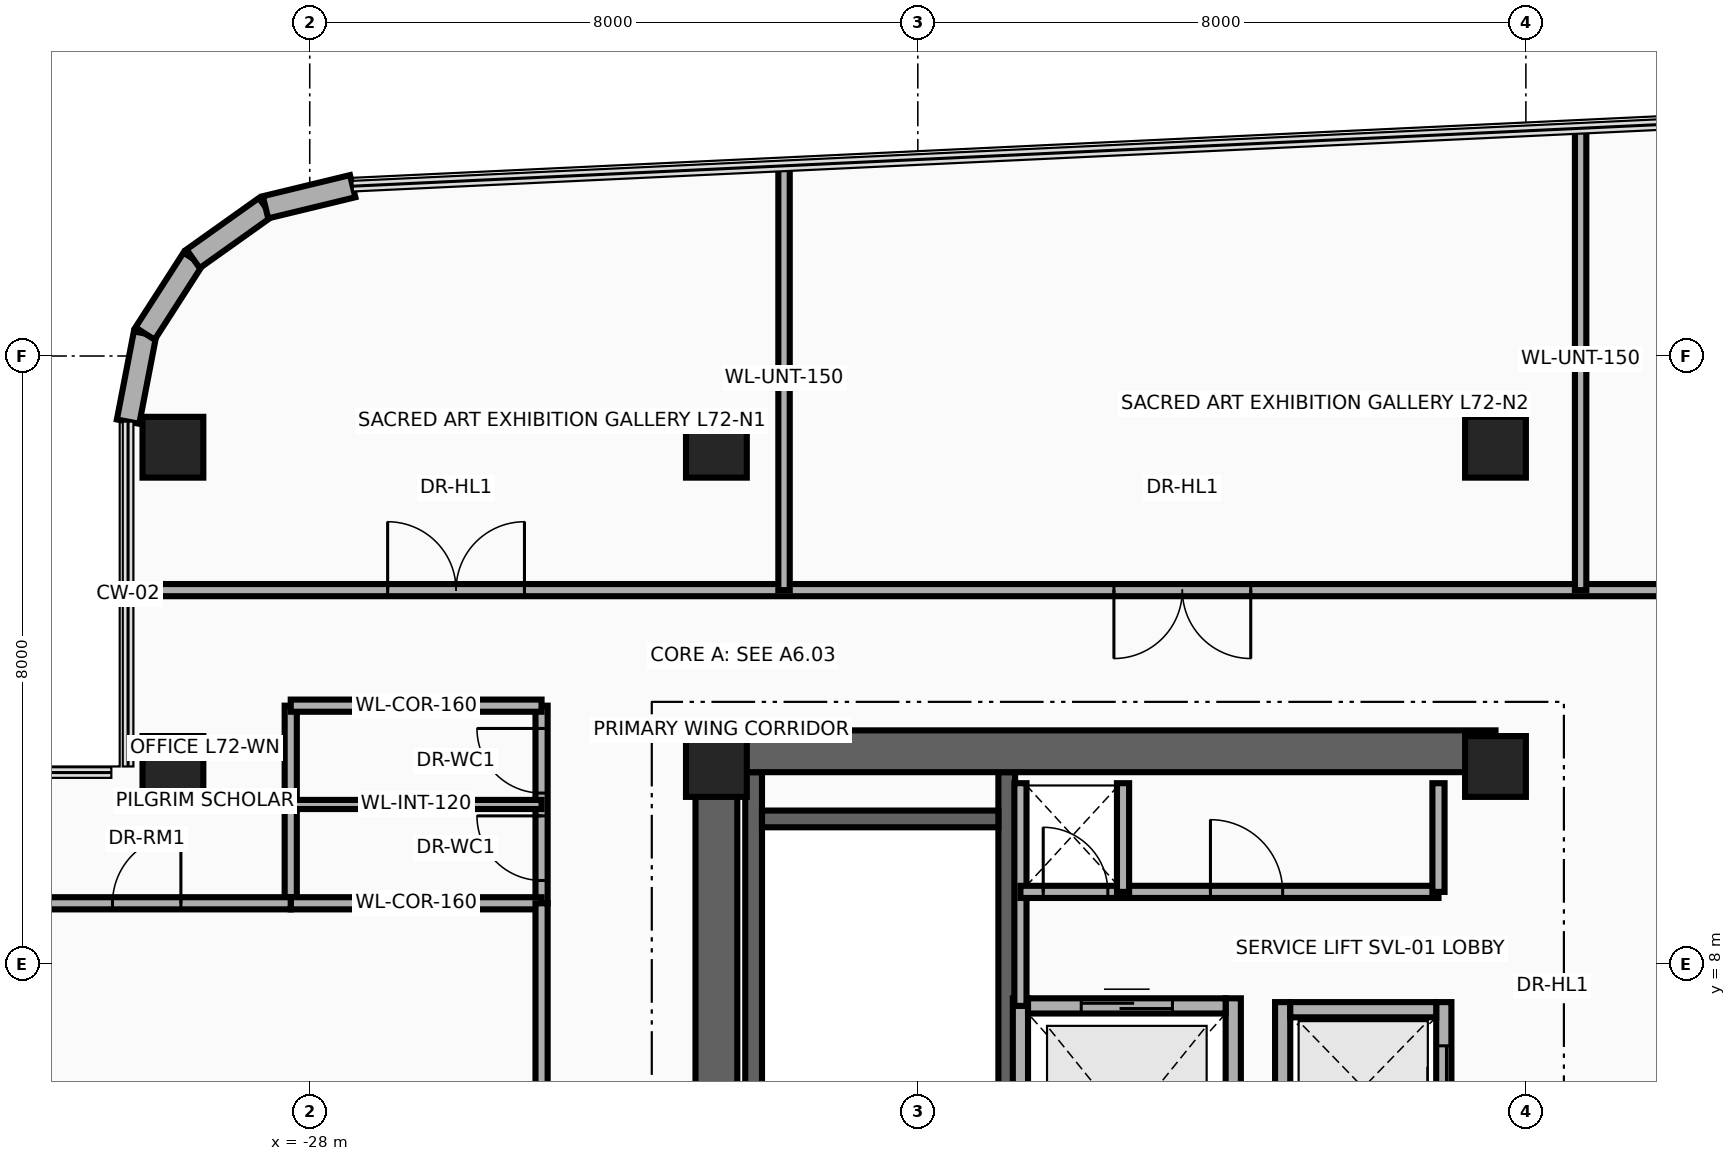
"""IFC4 building model, lengths in metres.
Left out: names, types, materials, properties, quantities, classifications, styles, units other than length and angle.
Written with IfcOpenShell. Run it as: python <this file> out.ifc"""

import sys

from ifc_helpers import new_model, si_unit, direction, frame, frame_2d, origin, origin_2d, place, context, subcontext, project, spatial, rectangle, extrude, source, transform, mapped, element, fill, save


model = new_model("IFC4")
c1 = context("Model", 3, precision=1e-05, world=origin(), true_north=direction((0.0, 1.0)))
c2 = subcontext(c1, "Body", "Model", "MODEL_VIEW")
j1 = project(units=[si_unit("LENGTHUNIT", "METRE"), si_unit("PLANEANGLEUNIT", "RADIAN")], contexts=[c1])
p1 = place(None, origin())
s1 = spatial("IfcSite", under=j1, at=p1, CompositionType="ELEMENT")
p2 = place(p1, origin())
s2 = spatial("IfcBuilding", under=s1, at=p2, CompositionType="ELEMENT")
p3 = place(p2, frame((0.0, 0.0, 276.5)))
s3 = spatial("IfcBuildingStorey", under=s2, at=p3, CompositionType="ELEMENT", Elevation=276.5)
for number, where, z_axis, x_axis in (
    (1, (-22.16, 1.78, 0.0), (0.0, 0.0, 1.0), (0.0, 1.0, 0.0)),
    (2, (-18.83, 1.78, 0.0), (0.0, 0.0, 1.0), (0.0, 1.0, 0.0)),
):
    element("IfcWall", number, at=place(p3, frame(where, z_axis=z_axis, x_axis=x_axis)), inside=s3, PredefinedType="SHEAR", context=c2, shape_type="SweptSolid", body=[
        extrude(rectangle(XDim=8.745, YDim=0.22, at=frame_2d((4.373, 0.0))), origin(), (0.0, 0.0, 1.0), 3.26),
    ])
p4 = place(p3, frame((-22.05, 9.91, 0.0), z_axis=(0.0, 0.0, 1.0), x_axis=(1.0, 0.0, 0.0)))
e3 = element("IfcWall", 3, at=p4, inside=s3, PredefinedType="SHEAR", context=c2, shape_type="SweptSolid", body=[
    extrude(rectangle(XDim=3.11, YDim=0.22, at=frame_2d((1.555, 0.0))), origin(), (0.0, 0.0, 1.0), 3.26),
])
p5 = place(p3, frame((-22.65, -11.075, 0.0), z_axis=(0.0, 0.0, 1.0), x_axis=(0.0, 1.0, 0.0)))
e4 = element("IfcWall", 4, at=p5, inside=s3, PredefinedType="SHEAR", context=c2, shape_type="SweptSolid", body=[
    extrude(rectangle(XDim=22.15, YDim=0.55, at=frame_2d((11.075, 0.0))), origin(), (0.0, 0.0, 1.0), 3.26),
])
p6 = place(p3, frame((-22.65, 10.8, 0.0), z_axis=(0.0, 0.0, 1.0), x_axis=(1.0, 0.0, 0.0)))
e5 = element("IfcWall", 5, at=p6, inside=s3, PredefinedType="SHEAR", context=c2, shape_type="SweptSolid", body=[
    extrude(rectangle(XDim=10.25, YDim=0.55, at=frame_2d((5.125, 0.0))), origin(), (0.0, 0.0, 1.0), 3.26),
])
m1 = source(origin(), c2, "Body", "SweptSolid", [
    extrude(rectangle(XDim=0.8, YDim=0.8, at=origin_2d()), origin(), (0.0, 0.0, 1.0), 3.5),
])
for number, where, z_axis, x_axis in (
    (6, (-29.8, 10.6, 0.0), (0.0, 0.0, 1.0), (1.0, 0.0, 0.0)),
    (7, (-22.65, 10.6, 0.0), (0.0, 0.0, 1.0), (1.0, 0.0, 0.0)),
    (8, (-12.4, 10.6, 0.0), (0.0, 0.0, 1.0), (1.0, 0.0, 0.0)),
    (9, (-29.8, 14.8, 0.0), (0.0, 0.0, 1.0), (1.0, 0.0, 0.0)),
    (10, (-22.65, 14.8, 0.0), (0.0, 0.0, 1.0), (1.0, 0.0, 0.0)),
    (11, (-12.4, 14.8, 0.0), (0.0, 0.0, 1.0), (1.0, 0.0, 0.0)),
):
    element("IfcColumn", number, at=place(p3, frame(where, z_axis=z_axis, x_axis=x_axis)), inside=s3, PredefinedType="COLUMN", context=c2, shape_type="MappedRepresentation", body=[
        mapped(m1, transform((0.0, 0.0, 0.0), x_axis=(1.0, 0.0, 0.0), y_axis=(0.0, 1.0, 0.0), z_axis=(0.0, 0.0, 1.0), scale=1.0)),
    ])
p7 = place(p3, frame((-30.39, 15.137, 0.0), z_axis=(0.0, 0.0, 1.0), x_axis=(0.189307792679, 0.981917796779, 0.0)))
e12 = element("IfcWall", 12, at=p7, inside=s3, PredefinedType="SOLIDWALL", context=c2, shape_type="SweptSolid", body=[
    extrude(rectangle(XDim=1.18, YDim=0.3, at=frame_2d((0.59, 0.0))), origin(), (0.0, 0.0, 1.0), 3.26),
])
p8 = place(p3, frame((-30.167, 16.295, 0.0), z_axis=(0.0, 0.0, 1.0), x_axis=(0.540842020947, 0.841124193195, 0.0)))
e13 = element("IfcWall", 13, at=p8, inside=s3, PredefinedType="SOLIDWALL", context=c2, shape_type="SweptSolid", body=[
    extrude(rectangle(XDim=1.169, YDim=0.3, at=frame_2d((0.584, 0.0))), origin(), (0.0, 0.0, 1.0), 3.26),
])
p9 = place(p3, frame((-29.534, 17.279, 0.0), z_axis=(0.0, 0.0, 1.0), x_axis=(0.81466371606, 0.579933642527, 0.0)))
e14 = element("IfcWall", 14, at=p9, inside=s3, PredefinedType="SOLIDWALL", context=c2, shape_type="SweptSolid", body=[
    extrude(rectangle(XDim=1.169, YDim=0.3, at=frame_2d((0.584, 0.0))), origin(), (0.0, 0.0, 1.0), 3.26),
])
p10 = place(p3, frame((-28.582, 17.957, 0.0), z_axis=(0.0, 0.0, 1.0), x_axis=(0.971929016595, 0.235274279725, 0.0)))
e15 = element("IfcWall", 15, at=p10, inside=s3, PredefinedType="SOLIDWALL", context=c2, shape_type="SweptSolid", body=[
    extrude(rectangle(XDim=1.18, YDim=0.3, at=frame_2d((0.59, 0.0))), origin(), (0.0, 0.0, 1.0), 3.26),
])
for number, where, z_axis, x_axis in (
    (16, (-18.65, 4.225, 0.0), (0.0, 0.0, 1.0), (0.0, 1.0, 0.0)),
    (17, (-15.85, 4.225, 0.0), (0.0, 0.0, 1.0), (0.0, 1.0, 0.0)),
):
    element("IfcWall", number, at=place(p3, frame(where, z_axis=z_axis, x_axis=x_axis)), inside=s3, PredefinedType="MOVABLE", context=c2, shape_type="SweptSolid", body=[
        extrude(rectangle(XDim=3.325, YDim=0.2, at=frame_2d((1.663, 0.0))), origin(), (0.0, 0.0, 1.0), 3.26),
    ])
p11 = place(p3, frame((-18.55, 7.45, 0.0), z_axis=(0.0, 0.0, 1.0), x_axis=(1.0, 0.0, 0.0)))
e18 = element("IfcWall", 18, at=p11, inside=s3, PredefinedType="MOVABLE", context=c2, shape_type="SweptSolid", body=[
    extrude(rectangle(XDim=2.6, YDim=0.2, at=frame_2d((1.3, 0.0))), origin(), (0.0, 0.0, 1.0), 3.26),
])
p12 = place(p11, frame((0.7, 0.0, 0.0)))
e19 = element("IfcOpeningElement", 19, at=p12, cuts=e18, PredefinedType="OPENING", context=c2, shape_type="SweptSolid", body=[
    extrude(rectangle(XDim=1.2, YDim=2.1, at=frame_2d((0.6, 1.05))), frame((0.0, 0.115, 0.0), z_axis=(0.0, -1.0, 0.0), x_axis=(1.0, 0.0, 0.0)), (0.0, 0.0, 1.0), 0.23),
])
p13 = place(p3, frame((-15.2, 5.25, 0.0), z_axis=(0.0, 0.0, 1.0), x_axis=(0.0, 1.0, 0.0)))
e20 = element("IfcWall", 20, at=p13, inside=s3, PredefinedType="MOVABLE", context=c2, shape_type="SweptSolid", body=[
    extrude(rectangle(XDim=2.25, YDim=0.2, at=frame_2d((1.125, 0.0))), origin(), (0.0, 0.0, 1.0), 3.26),
])
p14 = place(p3, frame((-13.08, 5.25, 0.0), z_axis=(0.0, 0.0, 1.0), x_axis=(0.0, 1.0, 0.0)))
e21 = element("IfcWall", 21, at=p14, inside=s3, PredefinedType="MOVABLE", context=c2, shape_type="SweptSolid", body=[
    extrude(rectangle(XDim=2.25, YDim=0.2, at=frame_2d((1.125, 0.0))), origin(), (0.0, 0.0, 1.0), 3.26),
])
p15 = place(p14, frame((0.575, 0.0, 0.0)))
e22 = element("IfcOpeningElement", 22, at=p15, cuts=e21, PredefinedType="OPENING", context=c2, shape_type="SweptSolid", body=[
    extrude(rectangle(XDim=1.1, YDim=2.1, at=frame_2d((0.55, 1.05))), frame((0.0, 0.115, 0.0), z_axis=(0.0, -1.0, 0.0), x_axis=(1.0, 0.0, 0.0)), (0.0, 0.0, 1.0), 0.23),
])
p16 = place(p3, frame((-15.1, 7.4, 0.0), z_axis=(0.0, 0.0, 1.0), x_axis=(1.0, 0.0, 0.0)))
e23 = element("IfcWall", 23, at=p16, inside=s3, PredefinedType="MOVABLE", context=c2, shape_type="SweptSolid", body=[
    extrude(rectangle(XDim=1.92, YDim=0.2, at=frame_2d((0.96, 0.0))), origin(), (0.0, 0.0, 1.0), 3.26),
])
p17 = place(p3, frame((-18.65, 7.45, 0.0), z_axis=(0.0, 0.0, 1.0), x_axis=(0.0, 1.0, 0.0)))
e24 = element("IfcWall", 24, at=p17, inside=s3, PredefinedType="PARTITIONING", context=c2, shape_type="SweptSolid", body=[
    extrude(rectangle(XDim=2.93, YDim=0.16, at=frame_2d((1.465, 0.0))), origin(), (0.0, 0.0, 1.0), 3.26),
])
p18 = place(p3, frame((-18.65, 8.95, 0.0), z_axis=(0.0, 0.0, 1.0), x_axis=(1.0, 0.0, 0.0)))
e25 = element("IfcWall", 25, at=p18, inside=s3, PredefinedType="PARTITIONING", context=c2, shape_type="SweptSolid", body=[
    extrude(rectangle(XDim=5.5, YDim=0.16, at=frame_2d((2.75, 0.0))), origin(), (0.0, 0.0, 1.0), 3.26),
])
p19 = place(p18, frame((0.3, 0.0, 0.0)))
e26 = element("IfcOpeningElement", 26, at=p19, cuts=e25, PredefinedType="OPENING", context=c2, shape_type="SweptSolid", body=[
    extrude(rectangle(XDim=0.85, YDim=2.05, at=frame_2d((0.425, 1.025))), frame((0.0, 0.095, 0.0), z_axis=(0.0, -1.0, 0.0), x_axis=(1.0, 0.0, 0.0)), (0.0, 0.0, 1.0), 0.19),
])
p20 = place(p18, frame((2.5, 0.0, 0.0)))
e27 = element("IfcOpeningElement", 27, at=p20, cuts=e25, PredefinedType="OPENING", context=c2, shape_type="SweptSolid", body=[
    extrude(rectangle(XDim=0.95, YDim=2.15, at=frame_2d((0.475, 1.075))), frame((0.0, 0.095, 0.0), z_axis=(0.0, -1.0, 0.0), x_axis=(1.0, 0.0, 0.0)), (0.0, 0.0, 1.0), 0.19),
])
for number, where, z_axis, x_axis in (
    (28, (-13.15, 8.95, 0.0), (0.0, 0.0, 1.0), (0.0, 1.0, 0.0)),
    (29, (-17.3, 8.95, 0.0), (0.0, 0.0, 1.0), (0.0, 1.0, 0.0)),
):
    element("IfcWall", number, at=place(p3, frame(where, z_axis=z_axis, x_axis=x_axis)), inside=s3, PredefinedType="PARTITIONING", context=c2, shape_type="SweptSolid", body=[
        extrude(rectangle(XDim=1.43, YDim=0.16, at=frame_2d((0.715, 0.0))), origin(), (0.0, 0.0, 1.0), 3.26),
    ])
p21 = place(p3, frame((-28.25, 8.8, 0.0), z_axis=(0.0, 0.0, 1.0), x_axis=(0.0, 1.0, 0.0)))
e30 = element("IfcWall", 30, at=p21, inside=s3, PredefinedType="PARTITIONING", context=c2, shape_type="SweptSolid", body=[
    extrude(rectangle(XDim=2.6, YDim=0.16, at=frame_2d((1.3, 0.0))), origin(), (0.0, 0.0, 1.0), 2.623),
])
p22 = place(p3, frame((-24.95, 8.8, 0.0), z_axis=(0.0, 0.0, 1.0), x_axis=(0.0, 1.0, 0.0)))
e31 = element("IfcWall", 31, at=p22, inside=s3, PredefinedType="PARTITIONING", context=c2, shape_type="SweptSolid", body=[
    extrude(rectangle(XDim=2.6, YDim=0.16, at=frame_2d((1.3, 0.0))), origin(), (0.0, 0.0, 1.0), 2.623),
])
p23 = place(p22, frame((0.3, 0.0, 0.0)))
e32 = element("IfcOpeningElement", 32, at=p23, cuts=e31, PredefinedType="OPENING", context=c2, shape_type="SweptSolid", body=[
    extrude(rectangle(XDim=0.85, YDim=2.1, at=frame_2d((0.425, 1.05))), frame((0.0, 0.095, 0.0), z_axis=(0.0, -1.0, 0.0), x_axis=(1.0, 0.0, 0.0)), (0.0, 0.0, 1.0), 0.19),
])
p24 = place(p22, frame((1.45, 0.0, 0.0)))
e33 = element("IfcOpeningElement", 33, at=p24, cuts=e31, PredefinedType="OPENING", context=c2, shape_type="SweptSolid", body=[
    extrude(rectangle(XDim=0.85, YDim=2.1, at=frame_2d((0.425, 1.05))), frame((0.0, 0.095, 0.0), z_axis=(0.0, -1.0, 0.0), x_axis=(1.0, 0.0, 0.0)), (0.0, 0.0, 1.0), 0.19),
])
for number, where, z_axis, x_axis in (
    (34, (-28.25, 8.8, 0.0), (0.0, 0.0, 1.0), (1.0, 0.0, 0.0)),
    (35, (-28.25, 11.4, 0.0), (0.0, 0.0, 1.0), (1.0, 0.0, 0.0)),
):
    element("IfcWall", number, at=place(p3, frame(where, z_axis=z_axis, x_axis=x_axis)), inside=s3, PredefinedType="PARTITIONING", context=c2, shape_type="SweptSolid", body=[
        extrude(rectangle(XDim=3.3, YDim=0.16, at=frame_2d((1.65, 0.0))), origin(), (0.0, 0.0, 1.0), 3.26),
    ])
p25 = place(p3, frame((-28.25, 10.1, 0.0), z_axis=(0.0, 0.0, 1.0), x_axis=(1.0, 0.0, 0.0)))
e36 = element("IfcWall", 36, at=p25, inside=s3, PredefinedType="PARTITIONING", context=c2, shape_type="SweptSolid", body=[
    extrude(rectangle(XDim=3.3, YDim=0.12, at=frame_2d((1.65, 0.0))), origin(), (0.0, 0.0, 1.0), 3.26),
])
p26 = place(p3, frame((-24.95, -11.42, 0.0), z_axis=(0.0, 0.0, 1.0), x_axis=(0.0, 1.0, 0.0)))
e37 = element("IfcWall", 37, at=p26, inside=s3, PredefinedType="PARTITIONING", context=c2, shape_type="SweptSolid", body=[
    extrude(rectangle(XDim=20.22, YDim=0.16, at=frame_2d((10.11, 0.0))), origin(), (0.0, 0.0, 1.0), 2.623),
])
p27 = place(p26, frame((4.155, 0.0, 0.0)))
e38 = element("IfcOpeningElement", 38, at=p27, cuts=e37, PredefinedType="OPENING", context=c2, shape_type="SweptSolid", body=[
    extrude(rectangle(XDim=1.8, YDim=2.15, at=frame_2d((0.9, 1.075))), frame((0.0, 0.095, 0.0), z_axis=(0.0, -1.0, 0.0), x_axis=(1.0, 0.0, 0.0)), (0.0, 0.0, 1.0), 0.19),
])
p28 = place(p26, frame((14.715, 0.0, 0.0)))
e39 = element("IfcOpeningElement", 39, at=p28, cuts=e37, PredefinedType="OPENING", context=c2, shape_type="SweptSolid", body=[
    extrude(rectangle(XDim=0.9, YDim=2.1, at=frame_2d((0.45, 1.05))), frame((0.0, 0.095, 0.0), z_axis=(0.0, -1.0, 0.0), x_axis=(1.0, 0.0, 0.0)), (0.0, 0.0, 1.0), 0.19),
])
p29 = place(p3, frame((-32.04, 8.8, 0.0), z_axis=(0.0, 0.0, 1.0), x_axis=(1.0, 0.0, 0.0)))
e40 = element("IfcWall", 40, at=p29, inside=s3, PredefinedType="PARTITIONING", context=c2, shape_type="SweptSolid", body=[
    extrude(rectangle(XDim=3.79, YDim=0.16, at=frame_2d((1.895, 0.0))), origin(), (0.0, 0.0, 1.0), 2.706),
])
p30 = place(p29, frame((1.445, 0.0, 0.0)))
e41 = element("IfcOpeningElement", 41, at=p30, cuts=e40, PredefinedType="OPENING", context=c2, shape_type="SweptSolid", body=[
    extrude(rectangle(XDim=0.9, YDim=2.1, at=frame_2d((0.45, 1.05))), frame((0.0, 0.095, 0.0), z_axis=(0.0, -1.0, 0.0), x_axis=(1.0, 0.0, 0.0)), (0.0, 0.0, 1.0), 0.19),
])
p31 = place(p3, frame((-30.39, 12.92, 0.0), z_axis=(0.0, 0.0, 1.0), x_axis=(1.0, 0.0, 0.0)))
e42 = element("IfcWall", 42, at=p31, inside=s3, PredefinedType="PARTITIONING", context=c2, shape_type="SweptSolid", body=[
    extrude(rectangle(XDim=29.48, YDim=0.16, at=frame_2d((14.74, 0.0))), origin(), (0.0, 0.0, 1.0), 2.634),
])
p32 = place(p31, frame((3.415, 0.0, 0.0)))
e43 = element("IfcOpeningElement", 43, at=p32, cuts=e42, PredefinedType="OPENING", context=c2, shape_type="SweptSolid", body=[
    extrude(rectangle(XDim=1.8, YDim=2.15, at=frame_2d((0.9, 1.075))), frame((0.0, 0.095, 0.0), z_axis=(0.0, -1.0, 0.0), x_axis=(1.0, 0.0, 0.0)), (0.0, 0.0, 1.0), 0.19),
])
p33 = place(p31, frame((12.97, 0.0, 0.0)))
e44 = element("IfcOpeningElement", 44, at=p33, cuts=e42, PredefinedType="OPENING", context=c2, shape_type="SweptSolid", body=[
    extrude(rectangle(XDim=1.8, YDim=2.15, at=frame_2d((0.9, 1.075))), frame((0.0, 0.095, 0.0), z_axis=(0.0, -1.0, 0.0), x_axis=(1.0, 0.0, 0.0)), (0.0, 0.0, 1.0), 0.19),
])
p34 = place(p31, frame((23.395, 0.0, 0.0)))
e45 = element("IfcOpeningElement", 45, at=p34, cuts=e42, PredefinedType="OPENING", context=c2, shape_type="SweptSolid", body=[
    extrude(rectangle(XDim=1.8, YDim=2.15, at=frame_2d((0.9, 1.075))), frame((0.0, 0.095, 0.0), z_axis=(0.0, -1.0, 0.0), x_axis=(1.0, 0.0, 0.0)), (0.0, 0.0, 1.0), 0.19),
])
p35 = place(p3, frame((-21.76, 12.92, 0.0), z_axis=(0.0, 0.0, 1.0), x_axis=(0.0, 1.0, 0.0)))
e46 = element("IfcWall", 46, at=p35, inside=s3, PredefinedType="PARTITIONING", context=c2, shape_type="SweptSolid", body=[
    extrude(rectangle(XDim=5.582, YDim=0.15, at=frame_2d((2.791, 0.0))), origin(), (0.0, 0.0, 1.0), 2.623),
])
p36 = place(p3, frame((-11.28, 12.92, 0.0), z_axis=(0.0, 0.0, 1.0), x_axis=(0.0, 1.0, 0.0)))
e47 = element("IfcWall", 47, at=p36, inside=s3, PredefinedType="PARTITIONING", context=c2, shape_type="SweptSolid", body=[
    extrude(rectangle(XDim=6.076, YDim=0.15, at=frame_2d((3.038, 0.0))), origin(), (0.0, 0.0, 1.0), 3.26),
])
p37 = place(p12, origin())
e48 = element("IfcDoor", 48, at=p37, inside=s3, OperationType="DOUBLE_DOOR_SLIDING", PredefinedType="DOOR", context=c2, shape_type="SweptSolid", body=[
    extrude(rectangle(XDim=1.2, YDim=2.1, at=frame_2d((0.6, 1.05))), frame((0.0, 0.025, 0.0), z_axis=(0.0, -1.0, 0.0), x_axis=(1.0, 0.0, 0.0)), (0.0, 0.0, 1.0), 0.05),
])
fill(e19, e48)
p38 = place(p15, origin())
e49 = element("IfcDoor", 49, at=p38, inside=s3, OperationType="DOUBLE_DOOR_SLIDING", PredefinedType="DOOR", context=c2, shape_type="SweptSolid", body=[
    extrude(rectangle(XDim=1.1, YDim=2.1, at=frame_2d((0.55, 1.05))), frame((0.0, 0.025, 0.0), z_axis=(0.0, -1.0, 0.0), x_axis=(1.0, 0.0, 0.0)), (0.0, 0.0, 1.0), 0.05),
])
fill(e22, e49)
p39 = place(p19, origin())
e50 = element("IfcDoor", 50, at=p39, inside=s3, OperationType="SINGLE_SWING_LEFT", PredefinedType="DOOR", context=c2, shape_type="SweptSolid", body=[
    extrude(rectangle(XDim=0.85, YDim=2.05, at=frame_2d((0.425, 1.025))), frame((0.0, 0.025, 0.0), z_axis=(0.0, -1.0, 0.0), x_axis=(1.0, 0.0, 0.0)), (0.0, 0.0, 1.0), 0.05),
])
fill(e26, e50)
p40 = place(p20, origin())
e51 = element("IfcDoor", 51, at=p40, inside=s3, OperationType="SINGLE_SWING_RIGHT", PredefinedType="DOOR", context=c2, shape_type="SweptSolid", body=[
    extrude(rectangle(XDim=0.95, YDim=2.15, at=frame_2d((0.475, 1.075))), frame((0.0, 0.025, 0.0), z_axis=(0.0, -1.0, 0.0), x_axis=(1.0, 0.0, 0.0)), (0.0, 0.0, 1.0), 0.05),
])
fill(e27, e51)
p41 = place(p23, origin())
e52 = element("IfcDoor", 52, at=p41, inside=s3, OperationType="SINGLE_SWING_RIGHT", PredefinedType="DOOR", context=c2, shape_type="SweptSolid", body=[
    extrude(rectangle(XDim=0.85, YDim=2.1, at=frame_2d((0.425, 1.05))), frame((0.0, 0.025, 0.0), z_axis=(0.0, -1.0, 0.0), x_axis=(1.0, 0.0, 0.0)), (0.0, 0.0, 1.0), 0.05),
])
fill(e32, e52)
p42 = place(p24, origin())
e53 = element("IfcDoor", 53, at=p42, inside=s3, OperationType="SINGLE_SWING_LEFT", PredefinedType="DOOR", context=c2, shape_type="SweptSolid", body=[
    extrude(rectangle(XDim=0.85, YDim=2.1, at=frame_2d((0.425, 1.05))), frame((0.0, 0.025, 0.0), z_axis=(0.0, -1.0, 0.0), x_axis=(1.0, 0.0, 0.0)), (0.0, 0.0, 1.0), 0.05),
])
fill(e33, e53)
p43 = place(p30, origin())
e54 = element("IfcDoor", 54, at=p43, inside=s3, OperationType="SINGLE_SWING_RIGHT", PredefinedType="DOOR", context=c2, shape_type="SweptSolid", body=[
    extrude(rectangle(XDim=0.9, YDim=2.1, at=frame_2d((0.45, 1.05))), frame((0.0, 0.025, 0.0), z_axis=(0.0, -1.0, 0.0), x_axis=(1.0, 0.0, 0.0)), (0.0, 0.0, 1.0), 0.05),
])
fill(e41, e54)
p44 = place(p32, origin())
e55 = element("IfcDoor", 55, at=p44, inside=s3, OperationType="DOUBLE_DOOR_SINGLE_SWING", PredefinedType="DOOR", context=c2, shape_type="SweptSolid", body=[
    extrude(rectangle(XDim=1.8, YDim=2.15, at=frame_2d((0.9, 1.075))), frame((0.0, 0.025, 0.0), z_axis=(0.0, -1.0, 0.0), x_axis=(1.0, 0.0, 0.0)), (0.0, 0.0, 1.0), 0.05),
])
fill(e43, e55)
p45 = place(p33, frame((1.8, 0.0, 0.0), z_axis=(0.0, 0.0, 1.0), x_axis=(-1.0, 0.0, 0.0)))
e56 = element("IfcDoor", 56, at=p45, inside=s3, OperationType="DOUBLE_DOOR_SINGLE_SWING", PredefinedType="DOOR", context=c2, shape_type="SweptSolid", body=[
    extrude(rectangle(XDim=1.8, YDim=2.15, at=frame_2d((0.9, 1.075))), frame((0.0, 0.025, 0.0), z_axis=(0.0, -1.0, 0.0), x_axis=(1.0, 0.0, 0.0)), (0.0, 0.0, 1.0), 0.05),
])
fill(e44, e56)
save(model, sys.argv[1])
